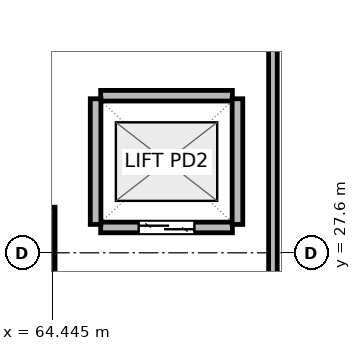
"""IFC4 building model, lengths in metres.
Left out: names, types, materials, properties, quantities, classifications, styles, units other than length and angle.
Written with IfcOpenShell. Run it as: python <this file> out.ifc"""

import sys

from ifc_helpers import new_model, si_unit, direction, frame, frame_2d, origin, origin_2d, place, context, subcontext, project, spatial, rectangle, extrude, element, fill, save


model = new_model("IFC4")
c1 = context("Model", 3, precision=1e-05, world=origin(), true_north=direction((0.0, 1.0)))
c2 = subcontext(c1, "Body", "Model", "MODEL_VIEW")
j1 = project(units=[si_unit("LENGTHUNIT", "METRE"), si_unit("PLANEANGLEUNIT", "RADIAN")], contexts=[c1])
p1 = place(None, origin())
s1 = spatial("IfcSite", under=j1, at=p1, CompositionType="ELEMENT")
p2 = place(p1, origin())
s2 = spatial("IfcBuilding", under=s1, at=p2, CompositionType="ELEMENT")
p3 = place(p2, frame((0.0, 0.0, 8.7)))
s3 = spatial("IfcBuildingStorey", under=s2, at=p3, CompositionType="ELEMENT", Elevation=8.7)
p4 = place(p3, frame((63.6, 27.6, 0.0), z_axis=(0.0, 0.0, 1.0), x_axis=(1.0, 0.0, 0.0)))
e1 = element("IfcColumn", 1, at=p4, inside=s3, PredefinedType="COLUMN", context=c2, shape_type="SweptSolid", body=[
    extrude(rectangle(XDim=1.8, YDim=1.8, at=origin_2d()), origin(), (0.0, 0.0, 1.0), 4.2),
])
p5 = place(p3, frame((65.4, 28.1, 0.0), z_axis=(0.0, 0.0, 1.0), x_axis=(1.0, 0.0, 0.0)))
e2 = element("IfcWall", 2, at=p5, inside=s3, PredefinedType="PARTITIONING", context=c2, shape_type="SweptSolid", body=[
    extrude(rectangle(XDim=2.6, YDim=0.21, at=frame_2d((1.3, 0.0))), origin(), (0.0, 0.0, 1.0), 3.88),
])
p6 = place(p5, frame((0.75, 0.0, 0.0)))
e3 = element("IfcOpeningElement", 3, at=p6, cuts=e2, PredefinedType="OPENING", context=c2, shape_type="SweptSolid", body=[
    extrude(rectangle(XDim=1.1, YDim=2.04, at=frame_2d((0.55, 1.02))), frame((0.0, 0.115, 0.0), z_axis=(0.0, -1.0, 0.0), x_axis=(1.0, 0.0, 0.0)), (0.0, 0.0, 1.0), 0.23),
])
p7 = place(p3, frame((65.4, 30.7, 0.0), z_axis=(0.0, 0.0, 1.0), x_axis=(1.0, 0.0, 0.0)))
e4 = element("IfcWall", 4, at=p7, inside=s3, PredefinedType="PARTITIONING", context=c2, shape_type="SweptSolid", body=[
    extrude(rectangle(XDim=2.6, YDim=0.21, at=frame_2d((1.3, 0.0))), origin(), (0.0, 0.0, 1.0), 3.88),
])
for number, where, z_axis, x_axis in (
    (5, (65.3, 28.16, 0.0), (0.0, 0.0, 1.0), (0.0, 1.0, 0.0)),
    (6, (68.1, 28.16, 0.0), (0.0, 0.0, 1.0), (0.0, 1.0, 0.0)),
):
    element("IfcWall", number, at=place(p3, frame(where, z_axis=z_axis, x_axis=x_axis)), inside=s3, PredefinedType="PARTITIONING", context=c2, shape_type="SweptSolid", body=[
        extrude(rectangle(XDim=2.48, YDim=0.21, at=frame_2d((1.24, 0.0))), origin(), (0.0, 0.0, 1.0), 3.88),
    ])
p8 = place(p3, frame((68.8, 25.187, 0.0), z_axis=(0.0, 0.0, 1.0), x_axis=(0.0, 1.0, 0.0)))
e7 = element("IfcWall", 7, at=p8, inside=s3, PredefinedType="PARTITIONING", context=c2, shape_type="SweptSolid", body=[
    extrude(rectangle(XDim=46.448, YDim=0.17, at=frame_2d((23.224, 0.0))), origin(), (0.0, 0.0, 1.0), 3.88),
])
p9 = place(p8, frame((15.913, 0.0, 0.0)))
e8 = element("IfcOpeningElement", 8, at=p9, cuts=e7, PredefinedType="OPENING", context=c2, shape_type="SweptSolid", body=[
    extrude(rectangle(XDim=1.1, YDim=2.05, at=frame_2d((0.55, 1.025))), frame((0.0, 0.095, 0.0), z_axis=(0.0, -1.0, 0.0), x_axis=(1.0, 0.0, 0.0)), (0.0, 0.0, 1.0), 0.19),
])
p10 = place(p6, origin())
e9 = element("IfcDoor", 9, at=p10, inside=s3, OperationType="DOUBLE_DOOR_SLIDING", PredefinedType="DOOR", context=c2, shape_type="SweptSolid", body=[
    extrude(rectangle(XDim=1.1, YDim=2.04, at=frame_2d((0.55, 1.02))), frame((0.0, 0.025, 0.0), z_axis=(0.0, -1.0, 0.0), x_axis=(1.0, 0.0, 0.0)), (0.0, 0.0, 1.0), 0.05),
])
fill(e3, e9)
save(model, sys.argv[1])
